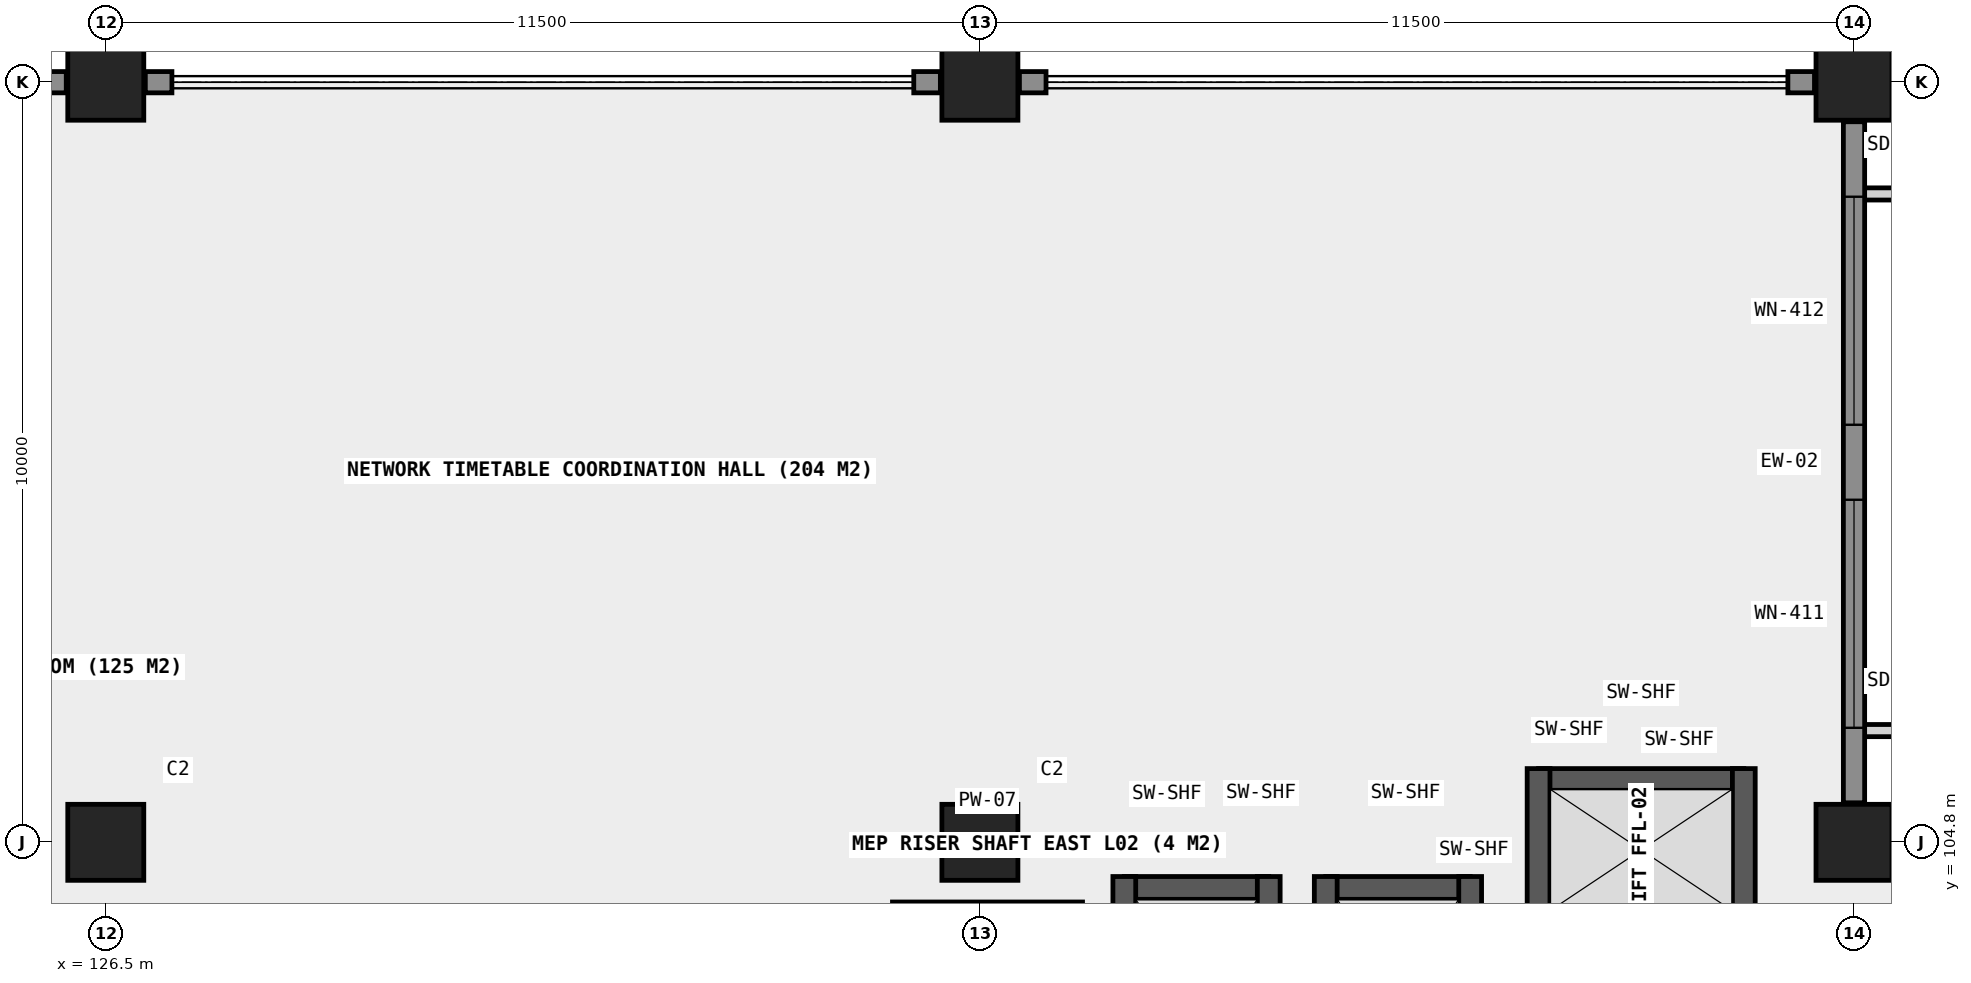
"""IFC4 building model, lengths in metres.
Left out: names, types, materials, properties, quantities, classifications, styles, units other than length and angle.
Written with IfcOpenShell. Run it as: python <this file> out.ifc"""

import sys

from ifc_helpers import new_model, si_unit, direction, frame, frame_2d, origin, origin_2d, place, context, subcontext, project, spatial, rectangle, extrude, element, fill, save


model = new_model("IFC4")
c1 = context("Model", 3, precision=1e-05, world=origin(), true_north=direction((0.0, 1.0)))
c2 = subcontext(c1, "Body", "Model", "MODEL_VIEW")
j1 = project(units=[si_unit("LENGTHUNIT", "METRE"), si_unit("PLANEANGLEUNIT", "RADIAN")], contexts=[c1])
p1 = place(None, origin())
s1 = spatial("IfcSite", under=j1, at=p1, CompositionType="ELEMENT")
p2 = place(p1, origin())
s2 = spatial("IfcBuilding", under=s1, at=p2, CompositionType="ELEMENT")
p3 = place(p2, frame((0.0, 0.0, 8.4)))
s3 = spatial("IfcBuildingStorey", under=s2, at=p3, CompositionType="ELEMENT", Elevation=8.4)
for number, where, z_axis, x_axis in (
    (1, (126.5, 104.8, 0.0), (0.0, 0.0, 1.0), (1.0, 0.0, 0.0)),
    (2, (126.5, 114.8, 0.0), (0.0, 0.0, 1.0), (1.0, 0.0, 0.0)),
    (3, (138.0, 104.8, 0.0), (0.0, 0.0, 1.0), (1.0, 0.0, 0.0)),
    (4, (138.0, 114.8, 0.0), (0.0, 0.0, 1.0), (1.0, 0.0, 0.0)),
    (5, (149.5, 104.8, 0.0), (0.0, 0.0, 1.0), (1.0, 0.0, 0.0)),
    (6, (149.5, 114.8, 0.0), (0.0, 0.0, 1.0), (1.0, 0.0, 0.0)),
):
    element("IfcColumn", number, at=place(p3, frame(where, z_axis=z_axis, x_axis=x_axis)), inside=s3, PredefinedType="COLUMN", context=c2, shape_type="SweptSolid", body=[
        extrude(rectangle(XDim=1.0, YDim=1.0, at=origin_2d()), origin(), (0.0, 0.0, 1.0), 5.4),
    ])
p4 = place(p3, frame((145.35, 105.62, 0.0), z_axis=(0.0, 0.0, 1.0), x_axis=(1.0, 0.0, 0.0)))
e7 = element("IfcWall", 7, at=p4, inside=s3, PredefinedType="SHEAR", context=c2, shape_type="SweptSolid", body=[
    extrude(rectangle(XDim=2.7, YDim=0.3, at=frame_2d((1.35, 0.0))), origin(), (0.0, 0.0, 1.0), 5.4),
])
for number, where, z_axis, x_axis in (
    (8, (145.35, 103.63, 0.0), (0.0, 0.0, 1.0), (0.0, 1.0, 0.0)),
    (9, (148.05, 103.63, 0.0), (0.0, 0.0, 1.0), (0.0, 1.0, 0.0)),
):
    element("IfcWall", number, at=place(p3, frame(where, z_axis=z_axis, x_axis=x_axis)), inside=s3, PredefinedType="SHEAR", context=c2, shape_type="SweptSolid", body=[
        extrude(rectangle(XDim=2.14, YDim=0.3, at=frame_2d((1.07, 0.0))), origin(), (0.0, 0.0, 1.0), 5.4),
    ])
p5 = place(p3, frame((139.9, 104.2, 0.0), z_axis=(0.0, 0.0, 1.0), x_axis=(1.0, 0.0, 0.0)))
e10 = element("IfcWall", 10, at=p5, inside=s3, PredefinedType="SHEAR", context=c2, shape_type="SweptSolid", body=[
    extrude(rectangle(XDim=1.9, YDim=0.3, at=frame_2d((0.95, 0.0))), origin(), (0.0, 0.0, 1.0), 5.4),
])
for number, where, z_axis, x_axis in (
    (11, (139.9, 101.35, 0.0), (0.0, 0.0, 1.0), (0.0, 1.0, 0.0)),
    (12, (141.8, 101.35, 0.0), (0.0, 0.0, 1.0), (0.0, 1.0, 0.0)),
):
    element("IfcWall", number, at=place(p3, frame(where, z_axis=z_axis, x_axis=x_axis)), inside=s3, PredefinedType="SHEAR", context=c2, shape_type="SweptSolid", body=[
        extrude(rectangle(XDim=3.0, YDim=0.3, at=frame_2d((1.5, 0.0))), origin(), (0.0, 0.0, 1.0), 5.4),
    ])
p6 = place(p3, frame((142.55, 104.2, 0.0), z_axis=(0.0, 0.0, 1.0), x_axis=(1.0, 0.0, 0.0)))
e13 = element("IfcWall", 13, at=p6, inside=s3, PredefinedType="SHEAR", context=c2, shape_type="SweptSolid", body=[
    extrude(rectangle(XDim=1.9, YDim=0.3, at=frame_2d((0.95, 0.0))), origin(), (0.0, 0.0, 1.0), 5.4),
])
for number, where, z_axis, x_axis in (
    (14, (142.55, 101.35, 0.0), (0.0, 0.0, 1.0), (0.0, 1.0, 0.0)),
    (15, (144.45, 101.35, 0.0), (0.0, 0.0, 1.0), (0.0, 1.0, 0.0)),
):
    element("IfcWall", number, at=place(p3, frame(where, z_axis=z_axis, x_axis=x_axis)), inside=s3, PredefinedType="SHEAR", context=c2, shape_type="SweptSolid", body=[
        extrude(rectangle(XDim=3.0, YDim=0.3, at=frame_2d((1.5, 0.0))), origin(), (0.0, 0.0, 1.0), 5.4),
    ])
p7 = place(p3, frame((149.5, 105.32, 0.0), z_axis=(0.0, 0.0, 1.0), x_axis=(0.0, 1.0, 0.0)))
e16 = element("IfcWall", 16, at=p7, inside=s3, PredefinedType="SOLIDWALL", context=c2, shape_type="SweptSolid", body=[
    extrude(rectangle(XDim=8.96, YDim=0.28, at=frame_2d((4.48, 0.0))), origin(), (0.0, 0.0, 1.0), 4.35),
])
p8 = place(p7, frame((0.987, 0.0, 0.85)))
e17 = element("IfcOpeningElement", 17, at=p8, cuts=e16, PredefinedType="OPENING", context=c2, shape_type="SweptSolid", body=[
    extrude(rectangle(XDim=3.0, YDim=2.0, at=frame_2d((1.5, 1.0))), frame((0.0, 0.15, 0.0), z_axis=(0.0, -1.0, 0.0), x_axis=(1.0, 0.0, 0.0)), (0.0, 0.0, 1.0), 0.3),
])
p9 = place(p7, frame((4.973, 0.0, 0.85)))
e18 = element("IfcOpeningElement", 18, at=p9, cuts=e16, PredefinedType="OPENING", context=c2, shape_type="SweptSolid", body=[
    extrude(rectangle(XDim=3.0, YDim=2.0, at=frame_2d((1.5, 1.0))), frame((0.0, 0.15, 0.0), z_axis=(0.0, -1.0, 0.0), x_axis=(1.0, 0.0, 0.0)), (0.0, 0.0, 1.0), 0.3),
])
p10 = place(p3, frame((115.52, 114.8, 0.0), z_axis=(0.0, 0.0, 1.0), x_axis=(1.0, 0.0, 0.0)))
e19 = element("IfcWall", 19, at=p10, inside=s3, PredefinedType="SOLIDWALL", context=c2, shape_type="SweptSolid", body=[
    extrude(rectangle(XDim=10.46, YDim=0.28, at=frame_2d((5.23, 0.0))), origin(), (0.0, 0.0, 1.0), 4.35),
])
p11 = place(p10, frame((1.92, 0.0, 0.85)))
e20 = element("IfcOpeningElement", 20, at=p11, cuts=e19, PredefinedType="OPENING", context=c2, shape_type="SweptSolid", body=[
    extrude(rectangle(XDim=2.35, YDim=2.05, at=frame_2d((1.175, 1.025))), frame((0.0, 0.15, 0.0), z_axis=(0.0, -1.0, 0.0), x_axis=(1.0, 0.0, 0.0)), (0.0, 0.0, 1.0), 0.3),
])
p12 = place(p10, frame((6.19, 0.0, 0.85)))
e21 = element("IfcOpeningElement", 21, at=p12, cuts=e19, PredefinedType="OPENING", context=c2, shape_type="SweptSolid", body=[
    extrude(rectangle(XDim=2.35, YDim=2.05, at=frame_2d((1.175, 1.025))), frame((0.0, 0.15, 0.0), z_axis=(0.0, -1.0, 0.0), x_axis=(1.0, 0.0, 0.0)), (0.0, 0.0, 1.0), 0.3),
])
for number, where, z_axis, x_axis in (
    (22, (127.02, 114.8, 0.0), (0.0, 0.0, 1.0), (1.0, 0.0, 0.0)),
    (23, (137.13, 114.8, 0.0), (0.0, 0.0, 1.0), (1.0, 0.0, 0.0)),
    (24, (138.52, 114.8, 0.0), (0.0, 0.0, 1.0), (1.0, 0.0, 0.0)),
    (25, (148.63, 114.8, 0.0), (0.0, 0.0, 1.0), (1.0, 0.0, 0.0)),
):
    element("IfcWall", number, at=place(p3, frame(where, z_axis=z_axis, x_axis=x_axis)), inside=s3, PredefinedType="SOLIDWALL", context=c2, shape_type="SweptSolid", body=[
        extrude(rectangle(XDim=0.35, YDim=0.28, at=frame_2d((0.175, 0.0))), origin(), (0.0, 0.0, 1.0), 5.13),
    ])
p13 = place(p3, frame((136.85, 103.95, 0.0), z_axis=(0.0, 0.0, 1.0), x_axis=(1.0, 0.0, 0.0)))
e26 = element("IfcWall", 26, at=p13, inside=s3, PredefinedType="PLUMBINGWALL", context=c2, shape_type="SweptSolid", body=[
    extrude(rectangle(XDim=2.5, YDim=0.13, at=frame_2d((1.25, 0.0))), origin(), (0.0, 0.0, 1.0), 5.12),
])
p14 = place(p8, origin())
e27 = element("IfcWindow", 27, at=p14, inside=s3, PartitioningType="SINGLE_PANEL", PredefinedType="WINDOW", context=c2, shape_type="SweptSolid", body=[
    extrude(rectangle(XDim=3.0, YDim=2.0, at=frame_2d((1.5, 1.0))), frame((0.0, 0.03, 0.0), z_axis=(0.0, -1.0, 0.0), x_axis=(1.0, 0.0, 0.0)), (0.0, 0.0, 1.0), 0.06),
])
fill(e17, e27)
p15 = place(p9, origin())
e28 = element("IfcWindow", 28, at=p15, inside=s3, PartitioningType="SINGLE_PANEL", PredefinedType="WINDOW", context=c2, shape_type="SweptSolid", body=[
    extrude(rectangle(XDim=3.0, YDim=2.0, at=frame_2d((1.5, 1.0))), frame((0.0, 0.03, 0.0), z_axis=(0.0, -1.0, 0.0), x_axis=(1.0, 0.0, 0.0)), (0.0, 0.0, 1.0), 0.06),
])
fill(e18, e28)
save(model, sys.argv[1])
